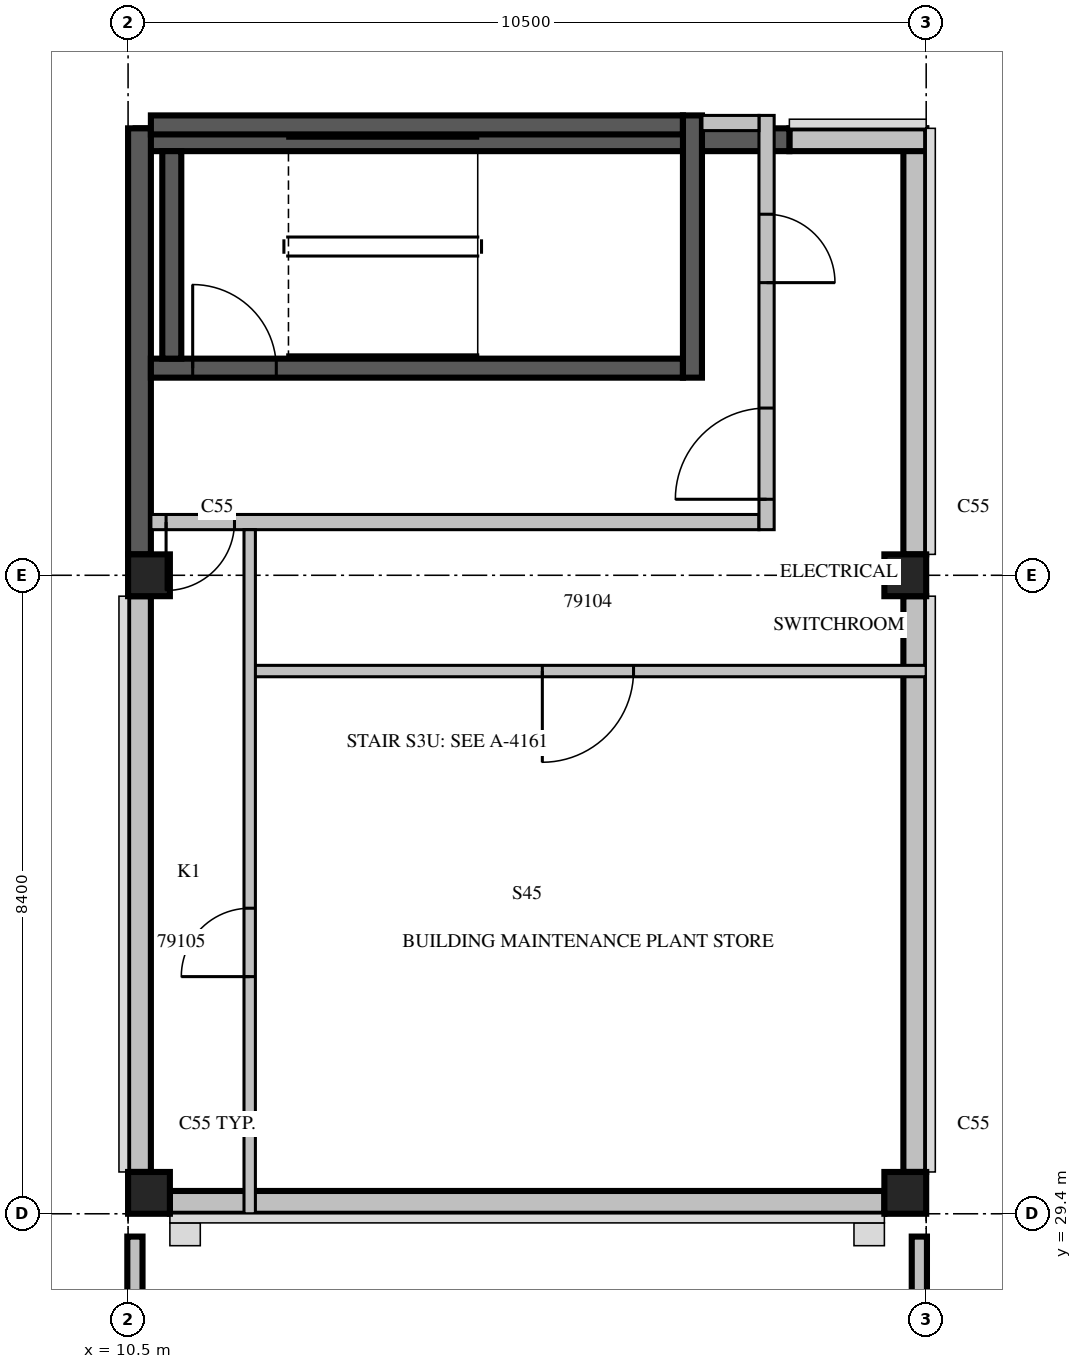
"""IFC4 building model, lengths in metres.
Left out: names, types, materials, properties, quantities, classifications, styles, units other than length and angle.
Written with IfcOpenShell. Run it as: python <this file> out.ifc"""

import sys

from ifc_helpers import new_model, si_unit, direction, frame, frame_2d, origin, origin_2d, place, context, subcontext, project, spatial, rectangle, extrude, source, transform, mapped, element, fill, save


model = new_model("IFC4")
c1 = context("Model", 3, precision=1e-05, world=origin(), true_north=direction((0.0, 1.0)))
c2 = subcontext(c1, "Body", "Model", "MODEL_VIEW")
j1 = project(units=[si_unit("LENGTHUNIT", "METRE"), si_unit("PLANEANGLEUNIT", "RADIAN")], contexts=[c1])
p1 = place(None, origin())
s1 = spatial("IfcSite", under=j1, at=p1, CompositionType="ELEMENT")
p2 = place(p1, origin())
s2 = spatial("IfcBuilding", under=s1, at=p2, CompositionType="ELEMENT")
p3 = place(p2, frame((0.0, 0.0, 368.5)))
s3 = spatial("IfcBuildingStorey", under=s2, at=p3, CompositionType="ELEMENT", Elevation=368.5)
m1 = source(origin(), c2, "Body", "SweptSolid", [
    extrude(rectangle(XDim=0.55, YDim=0.55, at=origin_2d()), origin(), (0.0, 0.0, 1.0), 4.0),
])
for number, where, z_axis, x_axis in (
    (1, (10.775, 29.675, 0.0), (0.0, 0.0, 1.0), (1.0, 0.0, 0.0)),
    (2, (20.725, 29.675, 0.0), (0.0, 0.0, 1.0), (1.0, 0.0, 0.0)),
    (3, (10.775, 37.8, 0.0), (0.0, 0.0, 1.0), (1.0, 0.0, 0.0)),
    (4, (20.725, 37.8, 0.0), (0.0, 0.0, 1.0), (1.0, 0.0, 0.0)),
):
    element("IfcColumn", number, at=place(p3, frame(where, z_axis=z_axis, x_axis=x_axis)), inside=s3, PredefinedType="COLUMN", context=c2, shape_type="MappedRepresentation", body=[
        mapped(m1, transform((0.0, 0.0, 0.0), scale=1.0)),
    ])
m2 = source(origin(), c2, "Body", "SweptSolid", [
    extrude(rectangle(XDim=9.4, YDim=0.3, at=frame_2d((4.7, 0.0))), origin(), (0.0, 0.0, 1.0), 3.136),
])
p4 = place(p3, frame((11.05, 29.55, 0.0), z_axis=(0.0, 0.0, 1.0), x_axis=(1.0, 0.0, 0.0)))
e5 = element("IfcWall", 5, at=p4, inside=s3, PredefinedType="STANDARD", context=c2, shape_type="MappedRepresentation", body=[
    mapped(m2, transform((0.0, 0.0, 0.0), scale=1.0)),
])
m3 = source(origin(), c2, "Body", "SweptSolid", [
    extrude(rectangle(XDim=7.575, YDim=0.3, at=frame_2d((3.788, 0.0))), origin(), (0.0, 0.0, 1.0), 3.136),
])
p5 = place(p3, frame((20.85, 29.95, 0.0), z_axis=(0.0, 0.0, 1.0), x_axis=(0.0, 1.0, 0.0)))
e6 = element("IfcWall", 6, at=p5, inside=s3, PredefinedType="STANDARD", context=c2, shape_type="MappedRepresentation", body=[
    mapped(m3, transform((0.0, 0.0, 0.0), scale=1.0)),
])
p6 = place(p3, frame((20.85, 38.075, 0.0), z_axis=(0.0, 0.0, 1.0), x_axis=(0.0, 1.0, 0.0)))
e7 = element("IfcWall", 7, at=p6, inside=s3, PredefinedType="STANDARD", context=c2, shape_type="SweptSolid", body=[
    extrude(rectangle(XDim=5.605, YDim=0.3, at=frame_2d((2.803, 0.0))), origin(), (0.0, 0.0, 1.0), 3.136),
])
p7 = place(p3, frame((21.0, 43.53, 0.0), z_axis=(0.0, 0.0, 1.0), x_axis=(-1.0, 0.0, 0.0)))
e8 = element("IfcWall", 8, at=p7, inside=s3, PredefinedType="STANDARD", context=c2, shape_type="SweptSolid", body=[
    extrude(rectangle(XDim=1.8, YDim=0.3, at=frame_2d((0.9, 0.0))), origin(), (0.0, 0.0, 1.0), 3.136),
])
p8 = place(p3, frame((19.2, 43.53, 0.0), z_axis=(0.0, 0.0, 1.0), x_axis=(-1.0, 0.0, 0.0)))
e9 = element("IfcWall", 9, at=p8, inside=s3, PredefinedType="SOLIDWALL", context=c2, shape_type="SweptSolid", body=[
    extrude(rectangle(XDim=8.6, YDim=0.3, at=frame_2d((4.3, 0.0))), origin(), (0.0, 0.0, 1.0), 3.136),
])
p9 = place(p3, frame((10.65, 43.68, 0.0), z_axis=(0.0, 0.0, 1.0), x_axis=(0.0, -1.0, 0.0)))
e10 = element("IfcWall", 10, at=p9, inside=s3, PredefinedType="SOLIDWALL", context=c2, shape_type="SweptSolid", body=[
    extrude(rectangle(XDim=5.605, YDim=0.3, at=frame_2d((2.803, 0.0))), origin(), (0.0, 0.0, 1.0), 3.136),
])
p10 = place(p3, frame((10.65, 37.525, 0.0), z_axis=(0.0, 0.0, 1.0), x_axis=(0.0, -1.0, 0.0)))
e11 = element("IfcWall", 11, at=p10, inside=s3, PredefinedType="STANDARD", context=c2, shape_type="MappedRepresentation", body=[
    mapped(m3, transform((0.0, 0.0, 0.0), scale=1.0)),
])
m4 = source(origin(), c2, "Body", "SweptSolid", [
    extrude(rectangle(XDim=7.15, YDim=0.2, at=frame_2d((3.575, 0.0))), origin(), (0.0, 0.0, 1.0), 1.1),
])
for number, where, z_axis, x_axis in (
    (12, (10.59, 21.95, 0.0), (0.0, 0.0, 1.0), (0.0, 1.0, 0.0)),
    (13, (20.91, 29.1, 0.0), (0.0, 0.0, 1.0), (0.0, -1.0, 0.0)),
):
    element("IfcWall", number, at=place(p3, frame(where, z_axis=z_axis, x_axis=x_axis)), inside=s3, PredefinedType="PARAPET", context=c2, shape_type="MappedRepresentation", body=[
        mapped(m4, transform((0.0, 0.0, 0.0), scale=1.0)),
    ])
m5 = source(origin(), c2, "Body", "SweptSolid", [
    extrude(rectangle(XDim=7.0, YDim=0.25, at=frame_2d((3.5, 0.0))), origin(), (0.0, 0.0, 1.0), 3.55),
])
p11 = place(p3, frame((10.8, 40.525, 0.0), z_axis=(0.0, 0.0, 1.0), x_axis=(1.0, 0.0, 0.0)))
e14 = element("IfcWall", 14, at=p11, inside=s3, PredefinedType="SOLIDWALL", context=c2, shape_type="MappedRepresentation", body=[
    mapped(m5, transform((0.0, 0.0, 0.0), scale=1.0)),
])
m6 = source(origin(), c2, "Body", "SweptSolid", [
    extrude(rectangle(XDim=1.1, YDim=2.1, at=frame_2d((0.55, 1.05))), frame((0.0, 0.135, 0.0), z_axis=(0.0, -1.0, 0.0), x_axis=(1.0, 0.0, 0.0)), (0.0, 0.0, 1.0), 0.27),
])
p12 = place(p11, frame((0.55, 0.0, 0.0)))
e15 = element("IfcOpeningElement", 15, at=p12, cuts=e14, PredefinedType="OPENING", context=c2, shape_type="MappedRepresentation", body=[
    mapped(m6, transform((0.0, 0.0, 0.0), scale=1.0)),
])
p13 = place(p3, frame((10.8, 43.725, 0.0), z_axis=(0.0, 0.0, 1.0), x_axis=(1.0, 0.0, 0.0)))
e16 = element("IfcWall", 16, at=p13, inside=s3, PredefinedType="SOLIDWALL", context=c2, shape_type="MappedRepresentation", body=[
    mapped(m5, transform((0.0, 0.0, 0.0), scale=1.0)),
])
m7 = source(origin(), c2, "Body", "SweptSolid", [
    extrude(rectangle(XDim=3.45, YDim=0.25, at=frame_2d((1.725, 0.0))), origin(), (0.0, 0.0, 1.0), 3.55),
])
p14 = place(p3, frame((17.925, 40.4, 0.0), z_axis=(0.0, 0.0, 1.0), x_axis=(0.0, 1.0, 0.0)))
e17 = element("IfcWall", 17, at=p14, inside=s3, PredefinedType="SOLIDWALL", context=c2, shape_type="MappedRepresentation", body=[
    mapped(m7, transform((0.0, 0.0, 0.0), scale=1.0)),
])
p15 = place(p3, frame((11.075, 40.65, 0.0), z_axis=(0.0, 0.0, 1.0), x_axis=(0.0, 1.0, 0.0)))
e18 = element("IfcWall", 18, at=p15, inside=s3, PredefinedType="SOLIDWALL", context=c2, shape_type="SweptSolid", body=[
    extrude(rectangle(XDim=2.73, YDim=0.25, at=frame_2d((1.365, 0.0))), origin(), (0.0, 0.0, 1.0), 3.55),
])
m8 = source(origin(), c2, "Body", "SweptSolid", [
    extrude(rectangle(XDim=8.0, YDim=0.2, at=frame_2d((4.0, 0.0))), origin(), (0.0, 0.0, 1.0), 3.55),
])
p16 = place(p3, frame((10.8, 38.5, 0.0), z_axis=(0.0, 0.0, 1.0), x_axis=(1.0, 0.0, 0.0)))
e19 = element("IfcWall", 19, at=p16, inside=s3, PredefinedType="PARTITIONING", context=c2, shape_type="MappedRepresentation", body=[
    mapped(m8, transform((0.0, 0.0, 0.0), scale=1.0)),
])
m9 = source(origin(), c2, "Body", "SweptSolid", [
    extrude(rectangle(XDim=0.9, YDim=2.1, at=frame_2d((0.45, 1.05))), frame((0.0, 0.11, 0.0), z_axis=(0.0, -1.0, 0.0), x_axis=(1.0, 0.0, 0.0)), (0.0, 0.0, 1.0), 0.22),
])
p17 = place(p16, frame((0.2, 0.0, 0.0)))
e20 = element("IfcOpeningElement", 20, at=p17, cuts=e19, PredefinedType="OPENING", context=c2, shape_type="MappedRepresentation", body=[
    mapped(m9, transform((0.0, 0.0, 0.0), scale=1.0)),
])
m10 = source(origin(), c2, "Body", "SweptSolid", [
    extrude(rectangle(XDim=5.45, YDim=0.2, at=frame_2d((2.725, 0.0))), origin(), (0.0, 0.0, 1.0), 3.55),
])
p18 = place(p3, frame((18.9, 38.4, 0.0), z_axis=(0.0, 0.0, 1.0), x_axis=(0.0, 1.0, 0.0)))
e21 = element("IfcWall", 21, at=p18, inside=s3, PredefinedType="PARTITIONING", context=c2, shape_type="MappedRepresentation", body=[
    mapped(m10, transform((0.0, 0.0, 0.0), scale=1.0)),
])
m11 = source(origin(), c2, "Body", "SweptSolid", [
    extrude(rectangle(XDim=1.2, YDim=2.1, at=frame_2d((0.6, 1.05))), frame((0.0, 0.11, 0.0), z_axis=(0.0, -1.0, 0.0), x_axis=(1.0, 0.0, 0.0)), (0.0, 0.0, 1.0), 0.22),
])
p19 = place(p18, frame((0.4, 0.0, 0.0)))
e22 = element("IfcOpeningElement", 22, at=p19, cuts=e21, PredefinedType="OPENING", context=c2, shape_type="MappedRepresentation", body=[
    mapped(m11, transform((0.0, 0.0, 0.0), scale=1.0)),
])
p20 = place(p18, frame((3.25, 0.0, 0.0)))
e23 = element("IfcOpeningElement", 23, at=p20, cuts=e21, PredefinedType="OPENING", context=c2, shape_type="MappedRepresentation", body=[
    mapped(m9, transform((0.0, 0.0, 0.0), scale=1.0)),
])
m12 = source(origin(), c2, "Body", "SweptSolid", [
    extrude(rectangle(XDim=0.75, YDim=0.2, at=frame_2d((0.375, 0.0))), origin(), (0.0, 0.0, 1.0), 3.55),
])
p21 = place(p3, frame((18.05, 43.75, 0.0), z_axis=(0.0, 0.0, 1.0), x_axis=(1.0, 0.0, 0.0)))
e24 = element("IfcWall", 24, at=p21, inside=s3, PredefinedType="PARTITIONING", context=c2, shape_type="MappedRepresentation", body=[
    mapped(m12, transform((0.0, 0.0, 0.0), scale=1.0)),
])
p22 = place(p3, frame((12.1, 36.54, 0.0), z_axis=(0.0, 0.0, 1.0), x_axis=(1.0, 0.0, 0.0)))
e25 = element("IfcWall", 25, at=p22, inside=s3, PredefinedType="PARTITIONING", context=c2, shape_type="SweptSolid", body=[
    extrude(rectangle(XDim=8.9, YDim=0.15, at=frame_2d((4.45, 0.0))), origin(), (0.0, 0.0, 1.0), 3.55),
])
m13 = source(origin(), c2, "Body", "SweptSolid", [
    extrude(rectangle(XDim=1.2, YDim=2.1, at=frame_2d((0.6, 1.05))), frame((0.0, 0.085, 0.0), z_axis=(0.0, -1.0, 0.0), x_axis=(1.0, 0.0, 0.0)), (0.0, 0.0, 1.0), 0.17),
])
p23 = place(p22, frame((3.85, 0.0, 0.0)))
e26 = element("IfcOpeningElement", 26, at=p23, cuts=e25, PredefinedType="OPENING", context=c2, shape_type="MappedRepresentation", body=[
    mapped(m13, transform((0.0, 0.0, 0.0), scale=1.0)),
])
m14 = source(origin(), c2, "Body", "SweptSolid", [
    extrude(rectangle(XDim=9.0, YDim=0.15, at=frame_2d((4.5, 0.0))), origin(), (0.0, 0.0, 1.0), 3.55),
])
p24 = place(p3, frame((12.1, 29.4, 0.0), z_axis=(0.0, 0.0, 1.0), x_axis=(0.0, 1.0, 0.0)))
e27 = element("IfcWall", 27, at=p24, inside=s3, PredefinedType="PARTITIONING", context=c2, shape_type="MappedRepresentation", body=[
    mapped(m14, transform((0.0, 0.0, 0.0), scale=1.0)),
])
m15 = source(origin(), c2, "Body", "SweptSolid", [
    extrude(rectangle(XDim=0.9, YDim=2.1, at=frame_2d((0.45, 1.05))), frame((0.0, 0.085, 0.0), z_axis=(0.0, -1.0, 0.0), x_axis=(1.0, 0.0, 0.0)), (0.0, 0.0, 1.0), 0.17),
])
p25 = place(p24, frame((3.12, 0.0, 0.0)))
e28 = element("IfcOpeningElement", 28, at=p25, cuts=e27, PredefinedType="OPENING", context=c2, shape_type="MappedRepresentation", body=[
    mapped(m15, transform((0.0, 0.0, 0.0), scale=1.0)),
])
m16 = source(origin(), c2, "Body", "SweptSolid", [
    extrude(rectangle(XDim=1.1, YDim=2.1, at=frame_2d((0.55, 1.05))), frame((0.0, 0.025, 0.0), z_axis=(0.0, -1.0, 0.0), x_axis=(1.0, 0.0, 0.0)), (0.0, 0.0, 1.0), 0.05),
])
p26 = place(p12, origin())
e29 = element("IfcDoor", 29, at=p26, inside=s3, OperationType="SINGLE_SWING_LEFT", PredefinedType="DOOR", context=c2, shape_type="MappedRepresentation", body=[
    mapped(m16, transform((0.0, 0.0, 0.0), scale=1.0)),
])
fill(e15, e29)
m17 = source(origin(), c2, "Body", "SweptSolid", [
    extrude(rectangle(XDim=0.9, YDim=2.1, at=frame_2d((0.45, 1.05))), frame((0.0, 0.025, 0.0), z_axis=(0.0, -1.0, 0.0), x_axis=(1.0, 0.0, 0.0)), (0.0, 0.0, 1.0), 0.05),
])
p27 = place(p17, origin())
e30 = element("IfcDoor", 30, at=p27, inside=s3, OperationType="SINGLE_SWING_RIGHT", PredefinedType="DOOR", context=c2, shape_type="MappedRepresentation", body=[
    mapped(m17, transform((0.0, 0.0, 0.0), scale=1.0)),
])
fill(e20, e30)
m18 = source(origin(), c2, "Body", "SweptSolid", [
    extrude(rectangle(XDim=1.2, YDim=2.1, at=frame_2d((0.6, 1.05))), frame((0.0, 0.025, 0.0), z_axis=(0.0, -1.0, 0.0), x_axis=(1.0, 0.0, 0.0)), (0.0, 0.0, 1.0), 0.05),
])
p28 = place(p19, origin())
e31 = element("IfcDoor", 31, at=p28, inside=s3, OperationType="SINGLE_SWING_LEFT", PredefinedType="DOOR", context=c2, shape_type="MappedRepresentation", body=[
    mapped(m18, transform((0.0, 0.0, 0.0), scale=1.0)),
])
fill(e22, e31)
p29 = place(p20, origin())
e32 = element("IfcDoor", 32, at=p29, inside=s3, OperationType="SINGLE_SWING_RIGHT", PredefinedType="DOOR", context=c2, shape_type="MappedRepresentation", body=[
    mapped(m17, transform((0.0, 0.0, 0.0), scale=1.0)),
])
fill(e23, e32)
p30 = place(p23, origin())
e33 = element("IfcDoor", 33, at=p30, inside=s3, OperationType="SINGLE_SWING_RIGHT", PredefinedType="DOOR", context=c2, shape_type="MappedRepresentation", body=[
    mapped(m18, transform((0.0, 0.0, 0.0), scale=1.0)),
])
fill(e26, e33)
p31 = place(p25, origin())
e34 = element("IfcDoor", 34, at=p31, inside=s3, OperationType="SINGLE_SWING_LEFT", PredefinedType="DOOR", context=c2, shape_type="MappedRepresentation", body=[
    mapped(m17, transform((0.0, 0.0, 0.0), scale=1.0)),
])
fill(e28, e34)
save(model, sys.argv[1])
